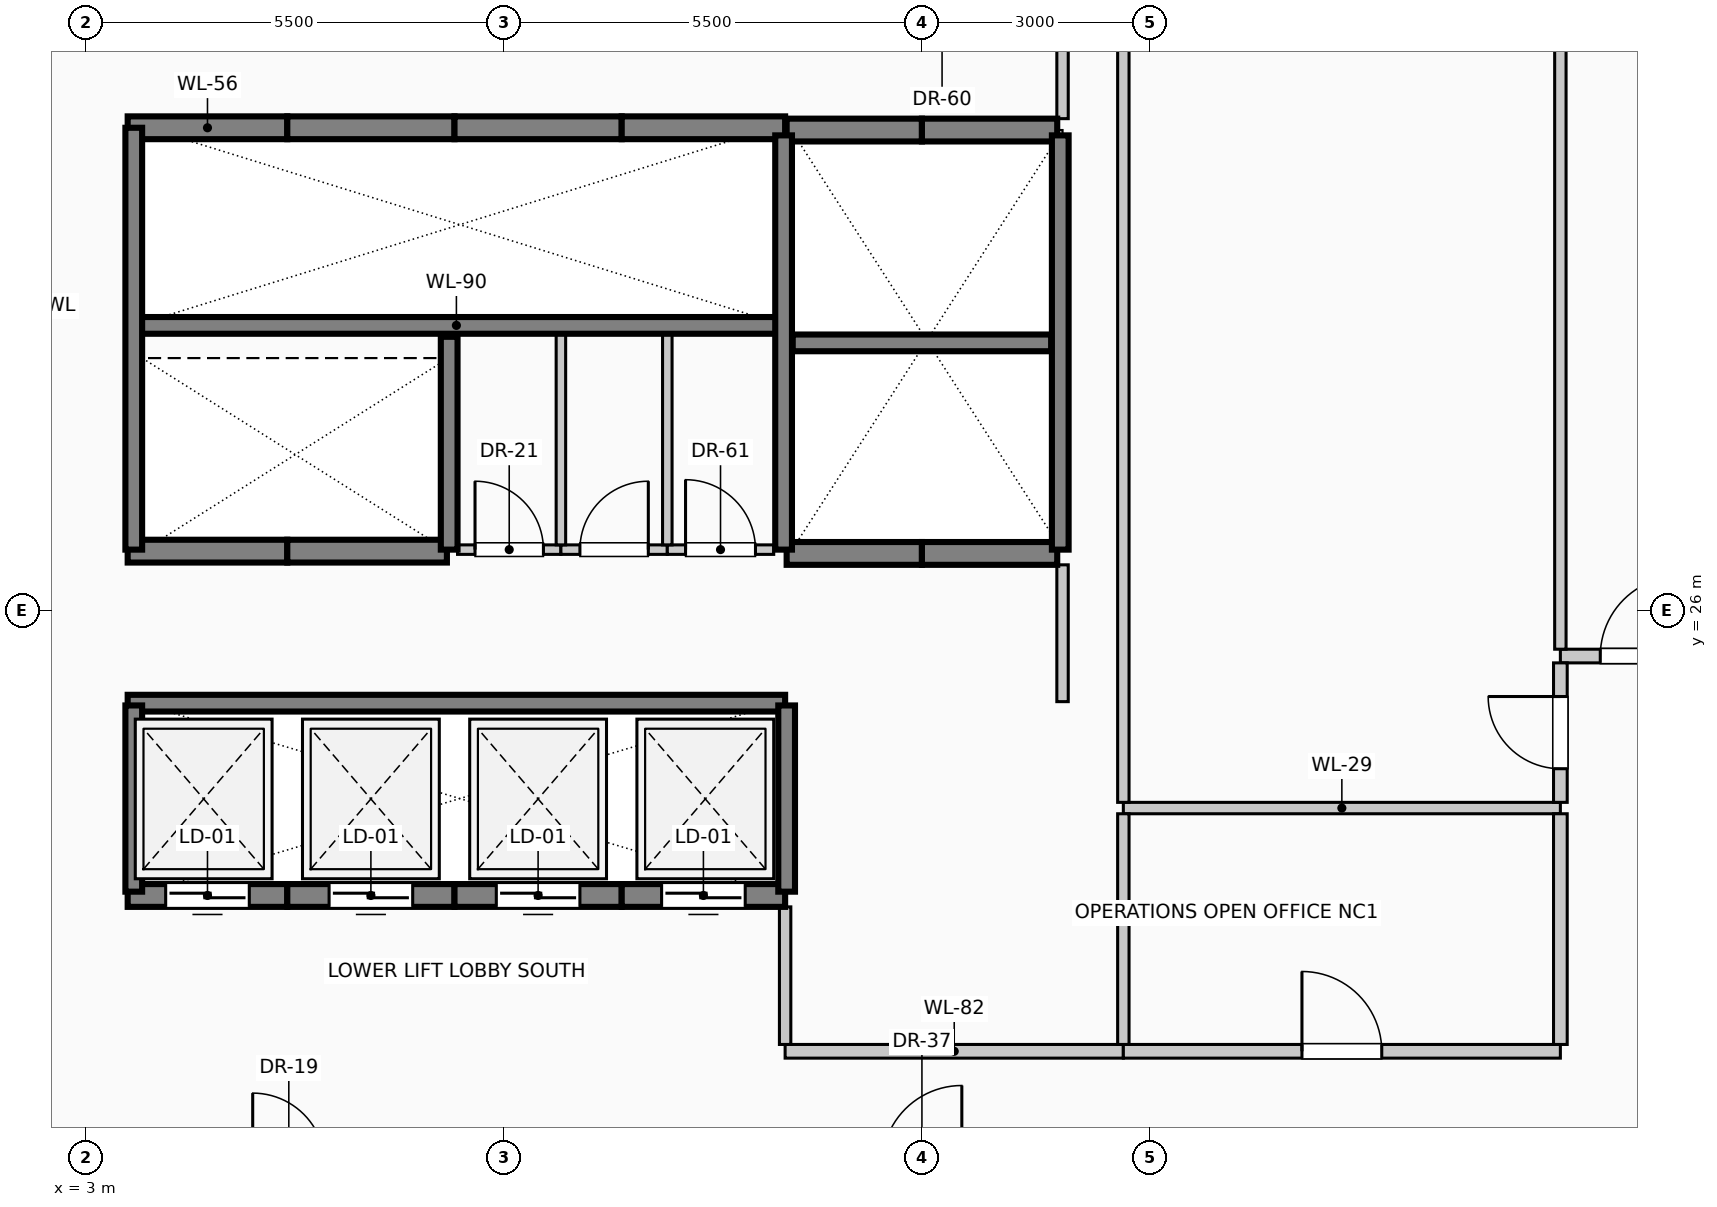
"""IFC4 building model, lengths in metres.
Left out: names, types, materials, properties, quantities, classifications, styles, units other than length and angle.
Written with IfcOpenShell. Run it as: python <this file> out.ifc"""

import sys

from ifc_helpers import new_model, si_unit, direction, frame, frame_2d, origin, place, context, subcontext, project, spatial, rectangle, extrude, element, fill, save


model = new_model("IFC4")
c1 = context("Model", 3, precision=1e-05, world=origin(), true_north=direction((0.0, 1.0)))
c2 = subcontext(c1, "Body", "Model", "MODEL_VIEW")
j1 = project(units=[si_unit("LENGTHUNIT", "METRE"), si_unit("PLANEANGLEUNIT", "RADIAN")], contexts=[c1])
p1 = place(None, origin())
s1 = spatial("IfcSite", under=j1, at=p1, CompositionType="ELEMENT")
p2 = place(p1, origin())
s2 = spatial("IfcBuilding", under=s1, at=p2, CompositionType="ELEMENT")
p3 = place(p2, frame((0.0, 0.0, 78.6)))
s3 = spatial("IfcBuildingStorey", under=s2, at=p3, CompositionType="ELEMENT", Elevation=78.6)
p4 = place(p3, frame((5.65, 22.25, 0.0), z_axis=(0.0, 0.0, 1.0), x_axis=(-1.0, 0.0, 0.0)))
e1 = element("IfcWall", 1, at=p4, inside=s3, PredefinedType="SOLIDWALL", context=c2, shape_type="SweptSolid", body=[
    extrude(rectangle(XDim=2.1, YDim=0.3, at=frame_2d((1.05, 0.0))), origin(), (0.0, 0.0, 1.0), 4.0),
])
p5 = place(p4, frame((0.5, 0.0, 0.0)))
e2 = element("IfcOpeningElement", 2, at=p5, cuts=e1, PredefinedType="OPENING", context=c2, shape_type="SweptSolid", body=[
    extrude(rectangle(XDim=1.1, YDim=2.2, at=frame_2d((0.55, 1.1))), frame((0.0, 0.16, 0.0), z_axis=(0.0, -1.0, 0.0), x_axis=(1.0, 0.0, 0.0)), (0.0, 0.0, 1.0), 0.32),
])
p6 = place(p3, frame((7.85, 22.25, 0.0), z_axis=(0.0, 0.0, 1.0), x_axis=(-1.0, 0.0, 0.0)))
e3 = element("IfcWall", 3, at=p6, inside=s3, PredefinedType="SOLIDWALL", context=c2, shape_type="SweptSolid", body=[
    extrude(rectangle(XDim=2.2, YDim=0.3, at=frame_2d((1.1, 0.0))), origin(), (0.0, 0.0, 1.0), 4.0),
])
p7 = place(p6, frame((0.55, 0.0, 0.0)))
e4 = element("IfcOpeningElement", 4, at=p7, cuts=e3, PredefinedType="OPENING", context=c2, shape_type="SweptSolid", body=[
    extrude(rectangle(XDim=1.1, YDim=2.2, at=frame_2d((0.55, 1.1))), frame((0.0, 0.16, 0.0), z_axis=(0.0, -1.0, 0.0), x_axis=(1.0, 0.0, 0.0)), (0.0, 0.0, 1.0), 0.32),
])
p8 = place(p3, frame((10.05, 22.25, 0.0), z_axis=(0.0, 0.0, 1.0), x_axis=(-1.0, 0.0, 0.0)))
e5 = element("IfcWall", 5, at=p8, inside=s3, PredefinedType="SOLIDWALL", context=c2, shape_type="SweptSolid", body=[
    extrude(rectangle(XDim=2.2, YDim=0.3, at=frame_2d((1.1, 0.0))), origin(), (0.0, 0.0, 1.0), 4.0),
])
p9 = place(p8, frame((0.55, 0.0, 0.0)))
e6 = element("IfcOpeningElement", 6, at=p9, cuts=e5, PredefinedType="OPENING", context=c2, shape_type="SweptSolid", body=[
    extrude(rectangle(XDim=1.1, YDim=2.2, at=frame_2d((0.55, 1.1))), frame((0.0, 0.16, 0.0), z_axis=(0.0, -1.0, 0.0), x_axis=(1.0, 0.0, 0.0)), (0.0, 0.0, 1.0), 0.32),
])
p10 = place(p3, frame((12.2, 22.25, 0.0), z_axis=(0.0, 0.0, 1.0), x_axis=(-1.0, 0.0, 0.0)))
e7 = element("IfcWall", 7, at=p10, inside=s3, PredefinedType="SOLIDWALL", context=c2, shape_type="SweptSolid", body=[
    extrude(rectangle(XDim=2.15, YDim=0.3, at=frame_2d((1.075, 0.0))), origin(), (0.0, 0.0, 1.0), 4.0),
])
p11 = place(p10, frame((0.525, 0.0, 0.0)))
e8 = element("IfcOpeningElement", 8, at=p11, cuts=e7, PredefinedType="OPENING", context=c2, shape_type="SweptSolid", body=[
    extrude(rectangle(XDim=1.1, YDim=2.2, at=frame_2d((0.55, 1.1))), frame((0.0, 0.16, 0.0), z_axis=(0.0, -1.0, 0.0), x_axis=(1.0, 0.0, 0.0)), (0.0, 0.0, 1.0), 0.32),
])
for number, where, z_axis, x_axis in (
    (9, (14.0, 26.75, 0.0), (0.0, 0.0, 1.0), (-1.0, 0.0, 0.0)),
    (10, (15.78, 26.75, 0.0), (0.0, 0.0, 1.0), (-1.0, 0.0, 0.0)),
    (11, (12.22, 32.32, 0.0), (0.0, 0.0, 1.0), (1.0, 0.0, 0.0)),
    (12, (14.0, 32.32, 0.0), (0.0, 0.0, 1.0), (1.0, 0.0, 0.0)),
):
    element("IfcWall", number, at=place(p3, frame(where, z_axis=z_axis, x_axis=x_axis)), inside=s3, PredefinedType="SOLIDWALL", context=c2, shape_type="SweptSolid", body=[
        extrude(rectangle(XDim=1.78, YDim=0.3, at=frame_2d((0.89, 0.0))), origin(), (0.0, 0.0, 1.0), 4.0),
    ])
p12 = place(p3, frame((3.55, 32.35, 0.0), z_axis=(0.0, 0.0, 1.0), x_axis=(1.0, 0.0, 0.0)))
e13 = element("IfcWall", 13, at=p12, inside=s3, PredefinedType="SOLIDWALL", context=c2, shape_type="SweptSolid", body=[
    extrude(rectangle(XDim=2.1, YDim=0.3, at=frame_2d((1.05, 0.0))), origin(), (0.0, 0.0, 1.0), 4.0),
])
p13 = place(p3, frame((5.65, 32.35, 0.0), z_axis=(0.0, 0.0, 1.0), x_axis=(1.0, 0.0, 0.0)))
e14 = element("IfcWall", 14, at=p13, inside=s3, PredefinedType="SOLIDWALL", context=c2, shape_type="SweptSolid", body=[
    extrude(rectangle(XDim=2.2, YDim=0.3, at=frame_2d((1.1, 0.0))), origin(), (0.0, 0.0, 1.0), 4.0),
])
p14 = place(p3, frame((7.85, 32.35, 0.0), z_axis=(0.0, 0.0, 1.0), x_axis=(1.0, 0.0, 0.0)))
e15 = element("IfcWall", 15, at=p14, inside=s3, PredefinedType="SOLIDWALL", context=c2, shape_type="SweptSolid", body=[
    extrude(rectangle(XDim=2.2, YDim=0.3, at=frame_2d((1.1, 0.0))), origin(), (0.0, 0.0, 1.0), 4.0),
])
p15 = place(p3, frame((10.05, 32.35, 0.0), z_axis=(0.0, 0.0, 1.0), x_axis=(1.0, 0.0, 0.0)))
e16 = element("IfcWall", 16, at=p15, inside=s3, PredefinedType="SOLIDWALL", context=c2, shape_type="SweptSolid", body=[
    extrude(rectangle(XDim=2.15, YDim=0.3, at=frame_2d((1.075, 0.0))), origin(), (0.0, 0.0, 1.0), 4.0),
])
p16 = place(p3, frame((5.65, 26.78, 0.0), z_axis=(0.0, 0.0, 1.0), x_axis=(-1.0, 0.0, 0.0)))
e17 = element("IfcWall", 17, at=p16, inside=s3, PredefinedType="SOLIDWALL", context=c2, shape_type="SweptSolid", body=[
    extrude(rectangle(XDim=2.1, YDim=0.3, at=frame_2d((1.05, 0.0))), origin(), (0.0, 0.0, 1.0), 4.0),
])
p17 = place(p3, frame((7.75, 26.78, 0.0), z_axis=(0.0, 0.0, 1.0), x_axis=(-1.0, 0.0, 0.0)))
e18 = element("IfcWall", 18, at=p17, inside=s3, PredefinedType="SOLIDWALL", context=c2, shape_type="SweptSolid", body=[
    extrude(rectangle(XDim=2.1, YDim=0.3, at=frame_2d((1.05, 0.0))), origin(), (0.0, 0.0, 1.0), 4.0),
])
p18 = place(p3, frame((3.55, 29.75, 0.0), z_axis=(0.0, 0.0, 1.0), x_axis=(1.0, 0.0, 0.0)))
e19 = element("IfcWall", 19, at=p18, inside=s3, PredefinedType="SOLIDWALL", context=c2, shape_type="SweptSolid", body=[
    extrude(rectangle(XDim=8.65, YDim=0.22, at=frame_2d((4.325, 0.0))), origin(), (0.0, 0.0, 1.0), 4.0),
])
p19 = place(p3, frame((3.63, 26.8, 0.0), z_axis=(0.0, 0.0, 1.0), x_axis=(0.0, 1.0, 0.0)))
e20 = element("IfcWall", 20, at=p19, inside=s3, PredefinedType="SOLIDWALL", context=c2, shape_type="SweptSolid", body=[
    extrude(rectangle(XDim=5.55, YDim=0.22, at=frame_2d((2.775, 0.0))), origin(), (0.0, 0.0, 1.0), 4.0),
])
p20 = place(p3, frame((7.78, 26.8, 0.0), z_axis=(0.0, 0.0, 1.0), x_axis=(0.0, 1.0, 0.0)))
e21 = element("IfcWall", 21, at=p20, inside=s3, PredefinedType="SOLIDWALL", context=c2, shape_type="SweptSolid", body=[
    extrude(rectangle(XDim=2.8, YDim=0.22, at=frame_2d((1.4, 0.0))), origin(), (0.0, 0.0, 1.0), 4.0),
])
for number, where, z_axis, x_axis in (
    (22, (12.18, 26.8, 0.0), (0.0, 0.0, 1.0), (0.0, 1.0, 0.0)),
    (23, (15.82, 26.8, 0.0), (0.0, 0.0, 1.0), (0.0, 1.0, 0.0)),
):
    element("IfcWall", number, at=place(p3, frame(where, z_axis=z_axis, x_axis=x_axis)), inside=s3, PredefinedType="SOLIDWALL", context=c2, shape_type="SweptSolid", body=[
        extrude(rectangle(XDim=5.45, YDim=0.22, at=frame_2d((2.725, 0.0))), origin(), (0.0, 0.0, 1.0), 4.0),
    ])
p21 = place(p3, frame((12.3, 29.52, 0.0), z_axis=(0.0, 0.0, 1.0), x_axis=(1.0, 0.0, 0.0)))
e24 = element("IfcWall", 24, at=p21, inside=s3, PredefinedType="SOLIDWALL", context=c2, shape_type="SweptSolid", body=[
    extrude(rectangle(XDim=3.4, YDim=0.22, at=frame_2d((1.7, 0.0))), origin(), (0.0, 0.0, 1.0), 4.0),
])
p22 = place(p3, frame((3.55, 24.78, 0.0), z_axis=(0.0, 0.0, 1.0), x_axis=(1.0, 0.0, 0.0)))
e25 = element("IfcWall", 25, at=p22, inside=s3, PredefinedType="SOLIDWALL", context=c2, shape_type="SweptSolid", body=[
    extrude(rectangle(XDim=8.65, YDim=0.22, at=frame_2d((4.325, 0.0))), origin(), (0.0, 0.0, 1.0), 4.0),
])
for number, where, z_axis, x_axis in (
    (26, (3.63, 22.3, 0.0), (0.0, 0.0, 1.0), (0.0, 1.0, 0.0)),
    (27, (12.22, 22.3, 0.0), (0.0, 0.0, 1.0), (0.0, 1.0, 0.0)),
):
    element("IfcWall", number, at=place(p3, frame(where, z_axis=z_axis, x_axis=x_axis)), inside=s3, PredefinedType="SOLIDWALL", context=c2, shape_type="SweptSolid", body=[
        extrude(rectangle(XDim=2.45, YDim=0.22, at=frame_2d((1.225, 0.0))), origin(), (0.0, 0.0, 1.0), 4.0),
    ])
p23 = place(p3, frame((12.2, 20.2, 0.0), z_axis=(0.0, 0.0, 1.0), x_axis=(1.0, 0.0, 0.0)))
e28 = element("IfcWall", 28, at=p23, inside=s3, PredefinedType="PARTITIONING", context=c2, shape_type="SweptSolid", body=[
    extrude(rectangle(XDim=4.45, YDim=0.18, at=frame_2d((2.225, 0.0))), origin(), (0.0, 0.0, 1.0), 3.66),
])
p24 = place(p3, frame((16.65, 20.2, 0.0), z_axis=(0.0, 0.0, 1.0), x_axis=(1.0, 0.0, 0.0)))
e29 = element("IfcWall", 29, at=p24, inside=s3, PredefinedType="PARTITIONING", context=c2, shape_type="SweptSolid", body=[
    extrude(rectangle(XDim=5.75, YDim=0.18, at=frame_2d((2.875, 0.0))), origin(), (0.0, 0.0, 1.0), 3.66),
])
p25 = place(p24, frame((2.35, 0.0, 0.0)))
e30 = element("IfcOpeningElement", 30, at=p25, cuts=e29, PredefinedType="OPENING", context=c2, shape_type="SweptSolid", body=[
    extrude(rectangle(XDim=1.05, YDim=2.15, at=frame_2d((0.525, 1.075))), frame((0.0, 0.1, 0.0), z_axis=(0.0, -1.0, 0.0), x_axis=(1.0, 0.0, 0.0)), (0.0, 0.0, 1.0), 0.2),
])
p26 = place(p3, frame((16.65, 23.4, 0.0), z_axis=(0.0, 0.0, 1.0), x_axis=(1.0, 0.0, 0.0)))
e31 = element("IfcWall", 31, at=p26, inside=s3, PredefinedType="PARTITIONING", context=c2, shape_type="SweptSolid", body=[
    extrude(rectangle(XDim=5.75, YDim=0.15, at=frame_2d((2.875, 0.0))), origin(), (0.0, 0.0, 1.0), 3.66),
])
p27 = place(p3, frame((22.4, 25.4, 0.0), z_axis=(0.0, 0.0, 1.0), x_axis=(1.0, 0.0, 0.0)))
e32 = element("IfcWall", 32, at=p27, inside=s3, PredefinedType="PARTITIONING", context=c2, shape_type="SweptSolid", body=[
    extrude(rectangle(XDim=2.1, YDim=0.18, at=frame_2d((1.05, 0.0))), origin(), (0.0, 0.0, 1.0), 3.055),
])
p28 = place(p27, frame((0.525, 0.0, 0.0)))
e33 = element("IfcOpeningElement", 33, at=p28, cuts=e32, PredefinedType="OPENING", context=c2, shape_type="SweptSolid", body=[
    extrude(rectangle(XDim=1.05, YDim=2.15, at=frame_2d((0.525, 1.075))), frame((0.0, 0.1, 0.0), z_axis=(0.0, -1.0, 0.0), x_axis=(1.0, 0.0, 0.0)), (0.0, 0.0, 1.0), 0.2),
])
p29 = place(p3, frame((7.89, 26.8, 0.0), z_axis=(0.0, 0.0, 1.0), x_axis=(1.0, 0.0, 0.0)))
e34 = element("IfcWall", 34, at=p29, inside=s3, PredefinedType="PARTITIONING", context=c2, shape_type="SweptSolid", body=[
    extrude(rectangle(XDim=1.36, YDim=0.125, at=frame_2d((0.68, 0.0))), origin(), (0.0, 0.0, 1.0), 3.66),
])
p30 = place(p29, frame((0.23, 0.0, 0.0)))
e35 = element("IfcOpeningElement", 35, at=p30, cuts=e34, PredefinedType="OPENING", context=c2, shape_type="SweptSolid", body=[
    extrude(rectangle(XDim=0.9, YDim=2.1, at=frame_2d((0.45, 1.05))), frame((0.0, 0.073, 0.0), z_axis=(0.0, -1.0, 0.0), x_axis=(1.0, 0.0, 0.0)), (0.0, 0.0, 1.0), 0.145),
])
p31 = place(p3, frame((9.25, 26.8, 0.0), z_axis=(0.0, 0.0, 1.0), x_axis=(1.0, 0.0, 0.0)))
e36 = element("IfcWall", 36, at=p31, inside=s3, PredefinedType="PARTITIONING", context=c2, shape_type="SweptSolid", body=[
    extrude(rectangle(XDim=1.4, YDim=0.125, at=frame_2d((0.7, 0.0))), origin(), (0.0, 0.0, 1.0), 3.66),
])
p32 = place(p31, frame((0.25, 0.0, 0.0)))
e37 = element("IfcOpeningElement", 37, at=p32, cuts=e36, PredefinedType="OPENING", context=c2, shape_type="SweptSolid", body=[
    extrude(rectangle(XDim=0.9, YDim=2.1, at=frame_2d((0.45, 1.05))), frame((0.0, 0.073, 0.0), z_axis=(0.0, -1.0, 0.0), x_axis=(1.0, 0.0, 0.0)), (0.0, 0.0, 1.0), 0.145),
])
p33 = place(p3, frame((10.65, 26.8, 0.0), z_axis=(0.0, 0.0, 1.0), x_axis=(1.0, 0.0, 0.0)))
e38 = element("IfcWall", 38, at=p33, inside=s3, PredefinedType="PARTITIONING", context=c2, shape_type="SweptSolid", body=[
    extrude(rectangle(XDim=1.4, YDim=0.125, at=frame_2d((0.7, 0.0))), origin(), (0.0, 0.0, 1.0), 3.66),
])
p34 = place(p33, frame((0.24, 0.0, 0.0)))
e39 = element("IfcOpeningElement", 39, at=p34, cuts=e38, PredefinedType="OPENING", context=c2, shape_type="SweptSolid", body=[
    extrude(rectangle(XDim=0.92, YDim=2.1, at=frame_2d((0.46, 1.05))), frame((0.0, 0.073, 0.0), z_axis=(0.0, -1.0, 0.0), x_axis=(1.0, 0.0, 0.0)), (0.0, 0.0, 1.0), 0.145),
])
for number, where, z_axis, x_axis in (
    (40, (9.25, 26.863, 0.0), (0.0, 0.0, 1.0), (0.0, 1.0, 0.0)),
    (41, (10.65, 26.863, 0.0), (0.0, 0.0, 1.0), (0.0, 1.0, 0.0)),
):
    element("IfcWall", number, at=place(p3, frame(where, z_axis=z_axis, x_axis=x_axis)), inside=s3, PredefinedType="PARTITIONING", context=c2, shape_type="SweptSolid", body=[
        extrude(rectangle(XDim=2.777, YDim=0.125, at=frame_2d((1.389, 0.0))), origin(), (0.0, 0.0, 1.0), 3.66),
    ])
p35 = place(p3, frame((12.2, 20.29, 0.0), z_axis=(0.0, 0.0, 1.0), x_axis=(0.0, 1.0, 0.0)))
e42 = element("IfcWall", 42, at=p35, inside=s3, PredefinedType="PARTITIONING", context=c2, shape_type="SweptSolid", body=[
    extrude(rectangle(XDim=1.81, YDim=0.15, at=frame_2d((0.905, 0.0))), origin(), (0.0, 0.0, 1.0), 3.66),
])
p36 = place(p3, frame((15.85, 24.8, 0.0), z_axis=(0.0, 0.0, 1.0), x_axis=(0.0, 1.0, 0.0)))
e43 = element("IfcWall", 43, at=p36, inside=s3, PredefinedType="PARTITIONING", context=c2, shape_type="SweptSolid", body=[
    extrude(rectangle(XDim=1.8, YDim=0.15, at=frame_2d((0.9, 0.0))), origin(), (0.0, 0.0, 1.0), 3.66),
])
p37 = place(p3, frame((15.85, 32.47, 0.0), z_axis=(0.0, 0.0, 1.0), x_axis=(0.0, 1.0, 0.0)))
e44 = element("IfcWall", 44, at=p37, inside=s3, PredefinedType="PARTITIONING", context=c2, shape_type="SweptSolid", body=[
    extrude(rectangle(XDim=1.03, YDim=0.15, at=frame_2d((0.515, 0.0))), origin(), (0.0, 0.0, 1.0), 3.66),
])
p38 = place(p3, frame((16.65, 20.29, 0.0), z_axis=(0.0, 0.0, 1.0), x_axis=(0.0, 1.0, 0.0)))
e45 = element("IfcWall", 45, at=p38, inside=s3, PredefinedType="PARTITIONING", context=c2, shape_type="SweptSolid", body=[
    extrude(rectangle(XDim=3.035, YDim=0.15, at=frame_2d((1.518, 0.0))), origin(), (0.0, 0.0, 1.0), 2.955),
])
p39 = place(p3, frame((16.65, 23.475, 0.0), z_axis=(0.0, 0.0, 1.0), x_axis=(0.0, 1.0, 0.0)))
e46 = element("IfcWall", 46, at=p39, inside=s3, PredefinedType="PARTITIONING", context=c2, shape_type="SweptSolid", body=[
    extrude(rectangle(XDim=10.025, YDim=0.15, at=frame_2d((5.012, 0.0))), origin(), (0.0, 0.0, 1.0), 2.955),
])
p40 = place(p3, frame((22.4, 20.29, 0.0), z_axis=(0.0, 0.0, 1.0), x_axis=(0.0, 1.0, 0.0)))
e47 = element("IfcWall", 47, at=p40, inside=s3, PredefinedType="PARTITIONING", context=c2, shape_type="SweptSolid", body=[
    extrude(rectangle(XDim=3.035, YDim=0.18, at=frame_2d((1.518, 0.0))), origin(), (0.0, 0.0, 1.0), 3.66),
])
p41 = place(p3, frame((22.4, 23.475, 0.0), z_axis=(0.0, 0.0, 1.0), x_axis=(0.0, 1.0, 0.0)))
e48 = element("IfcWall", 48, at=p41, inside=s3, PredefinedType="PARTITIONING", context=c2, shape_type="SweptSolid", body=[
    extrude(rectangle(XDim=1.835, YDim=0.18, at=frame_2d((0.917, 0.0))), origin(), (0.0, 0.0, 1.0), 3.66),
])
p42 = place(p41, frame((0.442, 0.0, 0.0)))
e49 = element("IfcOpeningElement", 49, at=p42, cuts=e48, PredefinedType="OPENING", context=c2, shape_type="SweptSolid", body=[
    extrude(rectangle(XDim=0.95, YDim=2.15, at=frame_2d((0.475, 1.075))), frame((0.0, 0.1, 0.0), z_axis=(0.0, -1.0, 0.0), x_axis=(1.0, 0.0, 0.0)), (0.0, 0.0, 1.0), 0.2),
])
p43 = place(p3, frame((22.4, 25.49, 0.0), z_axis=(0.0, 0.0, 1.0), x_axis=(0.0, 1.0, 0.0)))
e50 = element("IfcWall", 50, at=p43, inside=s3, PredefinedType="PARTITIONING", context=c2, shape_type="SweptSolid", body=[
    extrude(rectangle(XDim=19.77, YDim=0.15, at=frame_2d((9.885, 0.0))), origin(), (0.0, 0.0, 1.0), 3.66),
])
p44 = place(p5, origin())
e51 = element("IfcDoor", 51, at=p44, inside=s3, OperationType="SLIDING_TO_LEFT", PredefinedType="DOOR", context=c2, shape_type="SweptSolid", body=[
    extrude(rectangle(XDim=1.1, YDim=2.2, at=frame_2d((0.55, 1.1))), frame((0.0, 0.025, 0.0), z_axis=(0.0, -1.0, 0.0), x_axis=(1.0, 0.0, 0.0)), (0.0, 0.0, 1.0), 0.05),
])
fill(e2, e51)
p45 = place(p7, origin())
e52 = element("IfcDoor", 52, at=p45, inside=s3, OperationType="SLIDING_TO_RIGHT", PredefinedType="DOOR", context=c2, shape_type="SweptSolid", body=[
    extrude(rectangle(XDim=1.1, YDim=2.2, at=frame_2d((0.55, 1.1))), frame((0.0, 0.025, 0.0), z_axis=(0.0, -1.0, 0.0), x_axis=(1.0, 0.0, 0.0)), (0.0, 0.0, 1.0), 0.05),
])
fill(e4, e52)
p46 = place(p9, origin())
e53 = element("IfcDoor", 53, at=p46, inside=s3, OperationType="SLIDING_TO_LEFT", PredefinedType="DOOR", context=c2, shape_type="SweptSolid", body=[
    extrude(rectangle(XDim=1.1, YDim=2.2, at=frame_2d((0.55, 1.1))), frame((0.0, 0.025, 0.0), z_axis=(0.0, -1.0, 0.0), x_axis=(1.0, 0.0, 0.0)), (0.0, 0.0, 1.0), 0.05),
])
fill(e6, e53)
p47 = place(p11, origin())
e54 = element("IfcDoor", 54, at=p47, inside=s3, OperationType="SLIDING_TO_RIGHT", PredefinedType="DOOR", context=c2, shape_type="SweptSolid", body=[
    extrude(rectangle(XDim=1.1, YDim=2.2, at=frame_2d((0.55, 1.1))), frame((0.0, 0.025, 0.0), z_axis=(0.0, -1.0, 0.0), x_axis=(1.0, 0.0, 0.0)), (0.0, 0.0, 1.0), 0.05),
])
fill(e8, e54)
p48 = place(p25, origin())
e55 = element("IfcDoor", 55, at=p48, inside=s3, OperationType="SINGLE_SWING_LEFT", PredefinedType="DOOR", context=c2, shape_type="SweptSolid", body=[
    extrude(rectangle(XDim=1.05, YDim=2.15, at=frame_2d((0.525, 1.075))), frame((0.0, 0.025, 0.0), z_axis=(0.0, -1.0, 0.0), x_axis=(1.0, 0.0, 0.0)), (0.0, 0.0, 1.0), 0.05),
])
fill(e30, e55)
p49 = place(p28, origin())
e56 = element("IfcDoor", 56, at=p49, inside=s3, OperationType="SINGLE_SWING_RIGHT", PredefinedType="DOOR", context=c2, shape_type="SweptSolid", body=[
    extrude(rectangle(XDim=1.05, YDim=2.15, at=frame_2d((0.525, 1.075))), frame((0.0, 0.025, 0.0), z_axis=(0.0, -1.0, 0.0), x_axis=(1.0, 0.0, 0.0)), (0.0, 0.0, 1.0), 0.05),
])
fill(e33, e56)
p50 = place(p30, origin())
e57 = element("IfcDoor", 57, at=p50, inside=s3, OperationType="SINGLE_SWING_LEFT", PredefinedType="DOOR", context=c2, shape_type="SweptSolid", body=[
    extrude(rectangle(XDim=0.9, YDim=2.1, at=frame_2d((0.45, 1.05))), frame((0.0, 0.025, 0.0), z_axis=(0.0, -1.0, 0.0), x_axis=(1.0, 0.0, 0.0)), (0.0, 0.0, 1.0), 0.05),
])
fill(e35, e57)
p51 = place(p32, origin())
e58 = element("IfcDoor", 58, at=p51, inside=s3, OperationType="SINGLE_SWING_RIGHT", PredefinedType="DOOR", context=c2, shape_type="SweptSolid", body=[
    extrude(rectangle(XDim=0.9, YDim=2.1, at=frame_2d((0.45, 1.05))), frame((0.0, 0.025, 0.0), z_axis=(0.0, -1.0, 0.0), x_axis=(1.0, 0.0, 0.0)), (0.0, 0.0, 1.0), 0.05),
])
fill(e37, e58)
p52 = place(p34, origin())
e59 = element("IfcDoor", 59, at=p52, inside=s3, OperationType="SINGLE_SWING_LEFT", PredefinedType="DOOR", context=c2, shape_type="SweptSolid", body=[
    extrude(rectangle(XDim=0.92, YDim=2.1, at=frame_2d((0.46, 1.05))), frame((0.0, 0.025, 0.0), z_axis=(0.0, -1.0, 0.0), x_axis=(1.0, 0.0, 0.0)), (0.0, 0.0, 1.0), 0.05),
])
fill(e39, e59)
p53 = place(p42, origin())
e60 = element("IfcDoor", 60, at=p53, inside=s3, OperationType="SINGLE_SWING_RIGHT", PredefinedType="DOOR", context=c2, shape_type="SweptSolid", body=[
    extrude(rectangle(XDim=0.95, YDim=2.15, at=frame_2d((0.475, 1.075))), frame((0.0, 0.025, 0.0), z_axis=(0.0, -1.0, 0.0), x_axis=(1.0, 0.0, 0.0)), (0.0, 0.0, 1.0), 0.05),
])
fill(e49, e60)
save(model, sys.argv[1])
